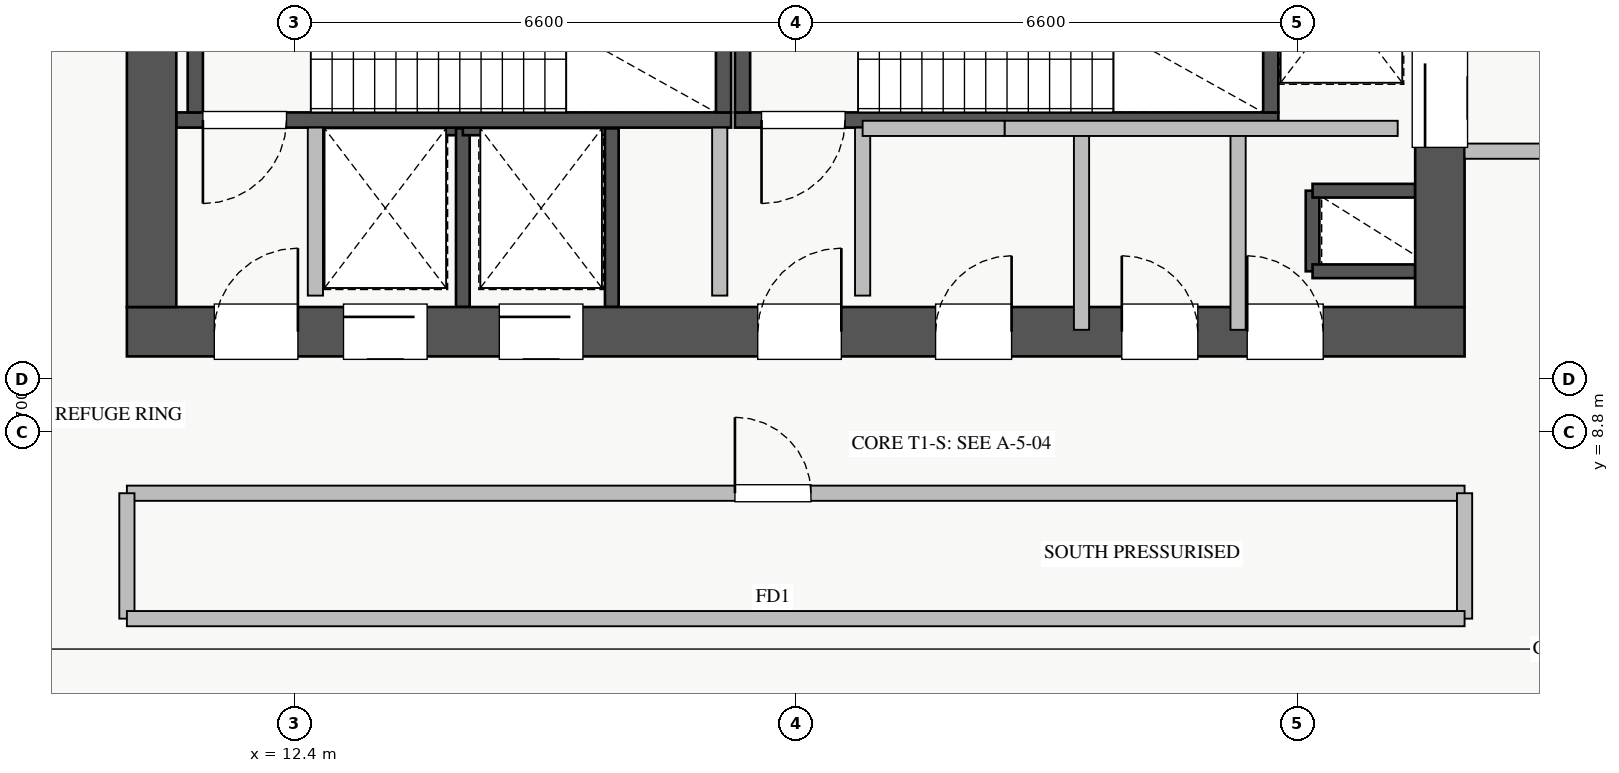
"""IFC4 building model, lengths in metres.
Left out: names, types, materials, properties, quantities, classifications, styles, units other than length and angle.
Written with IfcOpenShell. Run it as: python <this file> out.ifc"""

import sys

from ifc_helpers import new_model, si_unit, direction, frame, frame_2d, origin, place, context, subcontext, project, spatial, rectangle, extrude, source, transform, mapped, element, fill, save


model = new_model("IFC4")
c1 = context("Model", 3, precision=1e-05, world=origin(), true_north=direction((0.0, 1.0)))
c2 = subcontext(c1, "Body", "Model", "MODEL_VIEW")
j1 = project(units=[si_unit("LENGTHUNIT", "METRE"), si_unit("PLANEANGLEUNIT", "RADIAN")], contexts=[c1])
p1 = place(None, origin())
s1 = spatial("IfcSite", under=j1, at=p1, CompositionType="ELEMENT")
p2 = place(p1, origin())
s2 = spatial("IfcBuilding", under=s1, at=p2, CompositionType="ELEMENT")
p3 = place(p2, frame((0.0, 0.0, 139.25)))
s3 = spatial("IfcBuildingStorey", under=s2, at=p3, CompositionType="ELEMENT", Elevation=139.25)
p4 = place(p3, frame((12.68, 12.8, 0.0), z_axis=(0.0, 0.0, 1.0), x_axis=(1.0, 0.0, 0.0)))
e1 = element("IfcWall", 1, at=p4, inside=s3, PredefinedType="SHEAR", context=c2, shape_type="SweptSolid", body=[
    extrude(rectangle(XDim=1.94, YDim=0.18, at=frame_2d((0.97, 0.0))), origin(), (0.0, 0.0, 1.0), 4.32),
])
p5 = place(p3, frame((14.62, 10.45, 0.0), z_axis=(0.0, 0.0, 1.0), x_axis=(0.0, 1.0, 0.0)))
e2 = element("IfcWall", 2, at=p5, inside=s3, PredefinedType="SHEAR", context=c2, shape_type="SweptSolid", body=[
    extrude(rectangle(XDim=2.35, YDim=0.18, at=frame_2d((1.175, 0.0))), origin(), (0.0, 0.0, 1.0), 4.32),
])
p6 = place(p3, frame((25.8, 10.92, 0.0), z_axis=(0.0, 0.0, 1.0), x_axis=(0.0, 1.0, 0.0)))
e3 = element("IfcWall", 3, at=p6, inside=s3, PredefinedType="SHEAR", context=c2, shape_type="SweptSolid", body=[
    extrude(rectangle(XDim=1.06, YDim=0.18, at=frame_2d((0.53, 0.0))), origin(), (0.0, 0.0, 1.0), 4.32),
])
for number, where, z_axis, x_axis in (
    (4, (25.8, 11.98, 0.0), (0.0, 0.0, 1.0), (1.0, 0.0, 0.0)),
    (5, (25.8, 10.92, 0.0), (0.0, 0.0, 1.0), (1.0, 0.0, 0.0)),
):
    element("IfcWall", number, at=place(p3, frame(where, z_axis=z_axis, x_axis=x_axis)), inside=s3, PredefinedType="SHEAR", context=c2, shape_type="SweptSolid", body=[
        extrude(rectangle(XDim=1.35, YDim=0.18, at=frame_2d((0.675, 0.0))), origin(), (0.0, 0.0, 1.0), 4.32),
    ])
p7 = place(p3, frame((14.62, 12.8, 0.0), z_axis=(0.0, 0.0, 1.0), x_axis=(1.0, 0.0, 0.0)))
e6 = element("IfcWall", 6, at=p7, inside=s3, PredefinedType="SHEAR", context=c2, shape_type="SweptSolid", body=[
    extrude(rectangle(XDim=1.96, YDim=0.18, at=frame_2d((0.98, 0.0))), origin(), (0.0, 0.0, 1.0), 4.32),
])
p8 = place(p3, frame((16.58, 10.45, 0.0), z_axis=(0.0, 0.0, 1.0), x_axis=(0.0, 1.0, 0.0)))
e7 = element("IfcWall", 7, at=p8, inside=s3, PredefinedType="SHEAR", context=c2, shape_type="SweptSolid", body=[
    extrude(rectangle(XDim=2.35, YDim=0.18, at=frame_2d((1.175, 0.0))), origin(), (0.0, 0.0, 1.0), 4.32),
])
p9 = place(p3, frame((10.85, 12.91, 0.0), z_axis=(0.0, 0.0, 1.0), x_axis=(1.0, 0.0, 0.0)))
e8 = element("IfcWall", 8, at=p9, inside=s3, PredefinedType="SHEAR", context=c2, shape_type="SweptSolid", body=[
    extrude(rectangle(XDim=7.3, YDim=0.2, at=frame_2d((3.65, 0.0))), origin(), (0.0, 0.0, 1.0), 4.5),
])
p10 = place(p9, frame((0.35, 0.0, 0.0)))
e9 = element("IfcOpeningElement", 9, at=p10, cuts=e8, PredefinedType="OPENING", context=c2, shape_type="SweptSolid", body=[
    extrude(rectangle(XDim=1.1, YDim=2.05, at=frame_2d((0.55, 1.025))), frame((0.0, 0.11, 0.0), z_axis=(0.0, -1.0, 0.0), x_axis=(1.0, 0.0, 0.0)), (0.0, 0.0, 1.0), 0.22),
])
for number, where, z_axis, x_axis in (
    (10, (11.1, 13.01, 0.0), (0.0, 0.0, 1.0), (0.0, 1.0, 0.0)),
    (11, (18.05, 13.01, 0.0), (0.0, 0.0, 1.0), (0.0, 1.0, 0.0)),
):
    element("IfcWall", number, at=place(p3, frame(where, z_axis=z_axis, x_axis=x_axis)), inside=s3, PredefinedType="SHEAR", context=c2, shape_type="SweptSolid", body=[
        extrude(rectangle(XDim=2.94, YDim=0.2, at=frame_2d((1.47, 0.0))), origin(), (0.0, 0.0, 1.0), 4.5),
    ])
p11 = place(p3, frame((18.2, 12.91, 0.0), z_axis=(0.0, 0.0, 1.0), x_axis=(1.0, 0.0, 0.0)))
e12 = element("IfcWall", 12, at=p11, inside=s3, PredefinedType="SHEAR", context=c2, shape_type="SweptSolid", body=[
    extrude(rectangle(XDim=7.15, YDim=0.2, at=frame_2d((3.575, 0.0))), origin(), (0.0, 0.0, 1.0), 4.5),
])
p12 = place(p11, frame((0.35, 0.0, 0.0)))
e13 = element("IfcOpeningElement", 13, at=p12, cuts=e12, PredefinedType="OPENING", context=c2, shape_type="SweptSolid", body=[
    extrude(rectangle(XDim=1.1, YDim=2.05, at=frame_2d((0.55, 1.025))), frame((0.0, 0.11, 0.0), z_axis=(0.0, -1.0, 0.0), x_axis=(1.0, 0.0, 0.0)), (0.0, 0.0, 1.0), 0.22),
])
for number, where, z_axis, x_axis in (
    (14, (18.3, 13.01, 0.0), (0.0, 0.0, 1.0), (0.0, 1.0, 0.0)),
    (15, (25.25, 13.01, 0.0), (0.0, 0.0, 1.0), (0.0, 1.0, 0.0)),
):
    element("IfcWall", number, at=place(p3, frame(where, z_axis=z_axis, x_axis=x_axis)), inside=s3, PredefinedType="SHEAR", context=c2, shape_type="SweptSolid", body=[
        extrude(rectangle(XDim=2.94, YDim=0.2, at=frame_2d((1.47, 0.0))), origin(), (0.0, 0.0, 1.0), 4.5),
    ])
p13 = place(p3, frame((10.2, 10.125, 0.0), z_axis=(0.0, 0.0, 1.0), x_axis=(1.0, 0.0, 0.0)))
e16 = element("IfcWall", 16, at=p13, inside=s3, PredefinedType="SHEAR", context=c2, shape_type="SweptSolid", body=[
    extrude(rectangle(XDim=17.6, YDim=0.65, at=frame_2d((8.8, 0.0))), origin(), (0.0, 0.0, 1.0), 4.5),
])
p14 = place(p13, frame((1.15, 0.0, 0.0)))
e17 = element("IfcOpeningElement", 17, at=p14, cuts=e16, PredefinedType="OPENING", context=c2, shape_type="SweptSolid", body=[
    extrude(rectangle(XDim=1.1, YDim=2.05, at=frame_2d((0.55, 1.025))), frame((0.0, 0.335, 0.0), z_axis=(0.0, -1.0, 0.0), x_axis=(1.0, 0.0, 0.0)), (0.0, 0.0, 1.0), 0.67),
])
p15 = place(p13, frame((8.3, 0.0, 0.0)))
e18 = element("IfcOpeningElement", 18, at=p15, cuts=e16, PredefinedType="OPENING", context=c2, shape_type="SweptSolid", body=[
    extrude(rectangle(XDim=1.1, YDim=2.05, at=frame_2d((0.55, 1.025))), frame((0.0, 0.335, 0.0), z_axis=(0.0, -1.0, 0.0), x_axis=(1.0, 0.0, 0.0)), (0.0, 0.0, 1.0), 0.67),
])
p16 = place(p13, frame((4.9, 0.0, 0.0)))
e19 = element("IfcOpeningElement", 19, at=p16, cuts=e16, PredefinedType="OPENING", context=c2, shape_type="SweptSolid", body=[
    extrude(rectangle(XDim=1.1, YDim=2.05, at=frame_2d((0.55, 1.025))), frame((0.0, 0.335, 0.0), z_axis=(0.0, -1.0, 0.0), x_axis=(1.0, 0.0, 0.0)), (0.0, 0.0, 1.0), 0.67),
])
p17 = place(p13, frame((2.85, 0.0, 0.0)))
e20 = element("IfcOpeningElement", 20, at=p17, cuts=e16, PredefinedType="OPENING", context=c2, shape_type="SweptSolid", body=[
    extrude(rectangle(XDim=1.1, YDim=2.05, at=frame_2d((0.55, 1.025))), frame((0.0, 0.335, 0.0), z_axis=(0.0, -1.0, 0.0), x_axis=(1.0, 0.0, 0.0)), (0.0, 0.0, 1.0), 0.67),
])
p18 = place(p13, frame((14.74, 0.0, 0.0)))
e21 = element("IfcOpeningElement", 21, at=p18, cuts=e16, PredefinedType="OPENING", context=c2, shape_type="SweptSolid", body=[
    extrude(rectangle(XDim=1.0, YDim=2.05, at=frame_2d((0.5, 1.025))), frame((0.0, 0.335, 0.0), z_axis=(0.0, -1.0, 0.0), x_axis=(1.0, 0.0, 0.0)), (0.0, 0.0, 1.0), 0.67),
])
p19 = place(p13, frame((10.64, 0.0, 0.0)))
e22 = element("IfcOpeningElement", 22, at=p19, cuts=e16, PredefinedType="OPENING", context=c2, shape_type="SweptSolid", body=[
    extrude(rectangle(XDim=1.0, YDim=2.05, at=frame_2d((0.5, 1.025))), frame((0.0, 0.335, 0.0), z_axis=(0.0, -1.0, 0.0), x_axis=(1.0, 0.0, 0.0)), (0.0, 0.0, 1.0), 0.67),
])
p20 = place(p13, frame((13.09, 0.0, 0.0)))
e23 = element("IfcOpeningElement", 23, at=p20, cuts=e16, PredefinedType="OPENING", context=c2, shape_type="SweptSolid", body=[
    extrude(rectangle(XDim=1.0, YDim=2.05, at=frame_2d((0.5, 1.025))), frame((0.0, 0.335, 0.0), z_axis=(0.0, -1.0, 0.0), x_axis=(1.0, 0.0, 0.0)), (0.0, 0.0, 1.0), 0.67),
])
p21 = place(p3, frame((10.525, 10.45, 0.0), z_axis=(0.0, 0.0, 1.0), x_axis=(0.0, 1.0, 0.0)))
e24 = element("IfcWall", 24, at=p21, inside=s3, PredefinedType="SHEAR", context=c2, shape_type="SweptSolid", body=[
    extrude(rectangle(XDim=5.9, YDim=0.65, at=frame_2d((2.95, 0.0))), origin(), (0.0, 0.0, 1.0), 4.5),
])
p22 = place(p3, frame((27.475, 10.45, 0.0), z_axis=(0.0, 0.0, 1.0), x_axis=(0.0, 1.0, 0.0)))
e25 = element("IfcWall", 25, at=p22, inside=s3, PredefinedType="SHEAR", context=c2, shape_type="SweptSolid", body=[
    extrude(rectangle(XDim=5.9, YDim=0.65, at=frame_2d((2.95, 0.0))), origin(), (0.0, 0.0, 1.0), 4.5),
])
p23 = place(p22, frame((2.1, 0.0, 0.0)))
e26 = element("IfcOpeningElement", 26, at=p23, cuts=e25, PredefinedType="OPENING", context=c2, shape_type="SweptSolid", body=[
    extrude(rectangle(XDim=1.3, YDim=2.05, at=frame_2d((0.65, 1.025))), frame((0.0, 0.335, 0.0), z_axis=(0.0, -1.0, 0.0), x_axis=(1.0, 0.0, 0.0)), (0.0, 0.0, 1.0), 0.67),
])
p24 = place(p3, frame((27.8, 12.5, 0.0), z_axis=(0.0, 0.0, 1.0), x_axis=(1.0, 0.0, 0.0)))
e27 = element("IfcWall", 27, at=p24, inside=s3, PredefinedType="PARTITIONING", context=c2, shape_type="SweptSolid", body=[
    extrude(rectangle(XDim=3.1, YDim=0.2, at=frame_2d((1.55, 0.0))), origin(), (0.0, 0.0, 1.0), 4.32),
])
for number, where, z_axis, x_axis in (
    (28, (12.68, 10.6, 0.0), (0.0, 0.0, 1.0), (0.0, 1.0, 0.0)),
    (29, (18.0, 10.6, 0.0), (0.0, 0.0, 1.0), (0.0, 1.0, 0.0)),
    (30, (19.88, 10.6, 0.0), (0.0, 0.0, 1.0), (0.0, 1.0, 0.0)),
):
    element("IfcWall", number, at=place(p3, frame(where, z_axis=z_axis, x_axis=x_axis)), inside=s3, PredefinedType="PARTITIONING", context=c2, shape_type="SweptSolid", body=[
        extrude(rectangle(XDim=2.21, YDim=0.2, at=frame_2d((1.105, 0.0))), origin(), (0.0, 0.0, 1.0), 4.32),
    ])
p25 = place(p3, frame((24.82, 10.15, 0.0), z_axis=(0.0, 0.0, 1.0), x_axis=(0.0, 1.0, 0.0)))
e31 = element("IfcWall", 31, at=p25, inside=s3, PredefinedType="PARTITIONING", context=c2, shape_type="SweptSolid", body=[
    extrude(rectangle(XDim=2.65, YDim=0.2, at=frame_2d((1.325, 0.0))), origin(), (0.0, 0.0, 1.0), 4.32),
])
p26 = place(p3, frame((19.88, 12.8, 0.0), z_axis=(0.0, 0.0, 1.0), x_axis=(1.0, 0.0, 0.0)))
e32 = element("IfcWall", 32, at=p26, inside=s3, PredefinedType="PARTITIONING", context=c2, shape_type="SweptSolid", body=[
    extrude(rectangle(XDim=1.87, YDim=0.2, at=frame_2d((0.935, 0.0))), origin(), (0.0, 0.0, 1.0), 4.32),
])
p27 = place(p3, frame((22.76, 10.15, 0.0), z_axis=(0.0, 0.0, 1.0), x_axis=(0.0, 1.0, 0.0)))
e33 = element("IfcWall", 33, at=p27, inside=s3, PredefinedType="PARTITIONING", context=c2, shape_type="SweptSolid", body=[
    extrude(rectangle(XDim=2.65, YDim=0.2, at=frame_2d((1.325, 0.0))), origin(), (0.0, 0.0, 1.0), 4.32),
])
p28 = place(p3, frame((21.75, 12.8, 0.0), z_axis=(0.0, 0.0, 1.0), x_axis=(1.0, 0.0, 0.0)))
e34 = element("IfcWall", 34, at=p28, inside=s3, PredefinedType="PARTITIONING", context=c2, shape_type="SweptSolid", body=[
    extrude(rectangle(XDim=5.17, YDim=0.2, at=frame_2d((2.585, 0.0))), origin(), (0.0, 0.0, 1.0), 4.32),
])
p29 = place(p3, frame((10.2, 8.0, 0.0), z_axis=(0.0, 0.0, 1.0), x_axis=(1.0, 0.0, 0.0)))
e35 = element("IfcWall", 35, at=p29, inside=s3, PredefinedType="PARTITIONING", context=c2, shape_type="SweptSolid", body=[
    extrude(rectangle(XDim=17.6, YDim=0.2, at=frame_2d((8.8, 0.0))), origin(), (0.0, 0.0, 1.0), 4.32),
])
p30 = place(p29, frame((8.0, 0.0, 0.0)))
e36 = element("IfcOpeningElement", 36, at=p30, cuts=e35, PredefinedType="OPENING", context=c2, shape_type="SweptSolid", body=[
    extrude(rectangle(XDim=1.0, YDim=2.05, at=frame_2d((0.5, 1.025))), frame((0.0, 0.11, 0.0), z_axis=(0.0, -1.0, 0.0), x_axis=(1.0, 0.0, 0.0)), (0.0, 0.0, 1.0), 0.22),
])
for number, where, z_axis, x_axis in (
    (37, (10.2, 6.35, 0.0), (0.0, 0.0, 1.0), (0.0, 1.0, 0.0)),
    (38, (27.8, 6.35, 0.0), (0.0, 0.0, 1.0), (0.0, 1.0, 0.0)),
):
    element("IfcWall", number, at=place(p3, frame(where, z_axis=z_axis, x_axis=x_axis)), inside=s3, PredefinedType="PARTITIONING", context=c2, shape_type="SweptSolid", body=[
        extrude(rectangle(XDim=1.65, YDim=0.2, at=frame_2d((0.825, 0.0))), origin(), (0.0, 0.0, 1.0), 4.32),
    ])
p31 = place(p3, frame((10.2, 6.35, 0.0), z_axis=(0.0, 0.0, 1.0), x_axis=(1.0, 0.0, 0.0)))
e39 = element("IfcWall", 39, at=p31, inside=s3, PredefinedType="PARTITIONING", context=c2, shape_type="SweptSolid", body=[
    extrude(rectangle(XDim=17.6, YDim=0.2, at=frame_2d((8.8, 0.0))), origin(), (0.0, 0.0, 1.0), 4.32),
])
m1 = source(origin(), c2, "Body", "SweptSolid", [
    extrude(rectangle(XDim=1.3, YDim=2.05, at=frame_2d((0.65, 1.025))), frame((0.0, 0.025, 0.0), z_axis=(0.0, -1.0, 0.0), x_axis=(1.0, 0.0, 0.0)), (0.0, 0.0, 1.0), 0.05),
])
p32 = place(p23, origin())
e40 = element("IfcDoor", 40, at=p32, inside=s3, OperationType="SLIDING_TO_RIGHT", PredefinedType="DOOR", context=c2, shape_type="MappedRepresentation", body=[
    mapped(m1, transform((0.0, 0.0, 0.0), x_axis=(1.0, 0.0, 0.0), y_axis=(0.0, 1.0, 0.0), z_axis=(0.0, 0.0, 1.0), scale=1.0)),
])
fill(e26, e40)
m2 = source(origin(), c2, "Body", "SweptSolid", [
    extrude(rectangle(XDim=1.1, YDim=2.05, at=frame_2d((0.55, 1.025))), frame((0.0, 0.025, 0.0), z_axis=(0.0, -1.0, 0.0), x_axis=(1.0, 0.0, 0.0)), (0.0, 0.0, 1.0), 0.05),
])
p33 = place(p14, origin())
e41 = element("IfcDoor", 41, at=p33, inside=s3, OperationType="SINGLE_SWING_RIGHT", PredefinedType="DOOR", context=c2, shape_type="MappedRepresentation", body=[
    mapped(m2, transform((0.0, 0.0, 0.0), x_axis=(1.0, 0.0, 0.0), y_axis=(0.0, 1.0, 0.0), z_axis=(0.0, 0.0, 1.0), scale=1.0)),
])
fill(e17, e41)
p34 = place(p10, frame((1.1, 0.0, 0.0), z_axis=(0.0, 0.0, 1.0), x_axis=(-1.0, 0.0, 0.0)))
e42 = element("IfcDoor", 42, at=p34, inside=s3, OperationType="SINGLE_SWING_LEFT", PredefinedType="DOOR", context=c2, shape_type="MappedRepresentation", body=[
    mapped(m2, transform((0.0, 0.0, 0.0), x_axis=(1.0, 0.0, 0.0), y_axis=(0.0, 1.0, 0.0), z_axis=(0.0, 0.0, 1.0), scale=1.0)),
])
fill(e9, e42)
p35 = place(p15, origin())
e43 = element("IfcDoor", 43, at=p35, inside=s3, OperationType="SINGLE_SWING_RIGHT", PredefinedType="DOOR", context=c2, shape_type="MappedRepresentation", body=[
    mapped(m2, transform((0.0, 0.0, 0.0), x_axis=(1.0, 0.0, 0.0), y_axis=(0.0, 1.0, 0.0), z_axis=(0.0, 0.0, 1.0), scale=1.0)),
])
fill(e18, e43)
p36 = place(p12, frame((1.1, 0.0, 0.0), z_axis=(0.0, 0.0, 1.0), x_axis=(-1.0, 0.0, 0.0)))
e44 = element("IfcDoor", 44, at=p36, inside=s3, OperationType="SINGLE_SWING_LEFT", PredefinedType="DOOR", context=c2, shape_type="MappedRepresentation", body=[
    mapped(m2, transform((0.0, 0.0, 0.0), x_axis=(1.0, 0.0, 0.0), y_axis=(0.0, 1.0, 0.0), z_axis=(0.0, 0.0, 1.0), scale=1.0)),
])
fill(e13, e44)
p37 = place(p16, origin())
e45 = element("IfcDoor", 45, at=p37, inside=s3, OperationType="SLIDING_TO_RIGHT", PredefinedType="DOOR", context=c2, shape_type="MappedRepresentation", body=[
    mapped(m2, transform((0.0, 0.0, 0.0), x_axis=(1.0, 0.0, 0.0), y_axis=(0.0, 1.0, 0.0), z_axis=(0.0, 0.0, 1.0), scale=1.0)),
])
fill(e19, e45)
p38 = place(p17, origin())
e46 = element("IfcDoor", 46, at=p38, inside=s3, OperationType="SLIDING_TO_RIGHT", PredefinedType="DOOR", context=c2, shape_type="MappedRepresentation", body=[
    mapped(m2, transform((0.0, 0.0, 0.0), x_axis=(1.0, 0.0, 0.0), y_axis=(0.0, 1.0, 0.0), z_axis=(0.0, 0.0, 1.0), scale=1.0)),
])
fill(e20, e46)
m3 = source(origin(), c2, "Body", "SweptSolid", [
    extrude(rectangle(XDim=1.0, YDim=2.05, at=frame_2d((0.5, 1.025))), frame((0.0, 0.025, 0.0), z_axis=(0.0, -1.0, 0.0), x_axis=(1.0, 0.0, 0.0)), (0.0, 0.0, 1.0), 0.05),
])
p39 = place(p18, origin())
e47 = element("IfcDoor", 47, at=p39, inside=s3, OperationType="SINGLE_SWING_LEFT", PredefinedType="DOOR", context=c2, shape_type="MappedRepresentation", body=[
    mapped(m3, transform((0.0, 0.0, 0.0), x_axis=(1.0, 0.0, 0.0), y_axis=(0.0, 1.0, 0.0), z_axis=(0.0, 0.0, 1.0), scale=1.0)),
])
fill(e21, e47)
p40 = place(p19, origin())
e48 = element("IfcDoor", 48, at=p40, inside=s3, OperationType="SINGLE_SWING_RIGHT", PredefinedType="DOOR", context=c2, shape_type="MappedRepresentation", body=[
    mapped(m3, transform((0.0, 0.0, 0.0), x_axis=(1.0, 0.0, 0.0), y_axis=(0.0, 1.0, 0.0), z_axis=(0.0, 0.0, 1.0), scale=1.0)),
])
fill(e22, e48)
p41 = place(p20, origin())
e49 = element("IfcDoor", 49, at=p41, inside=s3, OperationType="SINGLE_SWING_LEFT", PredefinedType="DOOR", context=c2, shape_type="MappedRepresentation", body=[
    mapped(m3, transform((0.0, 0.0, 0.0), x_axis=(1.0, 0.0, 0.0), y_axis=(0.0, 1.0, 0.0), z_axis=(0.0, 0.0, 1.0), scale=1.0)),
])
fill(e23, e49)
p42 = place(p30, origin())
e50 = element("IfcDoor", 50, at=p42, inside=s3, OperationType="SINGLE_SWING_LEFT", PredefinedType="DOOR", context=c2, shape_type="MappedRepresentation", body=[
    mapped(m3, transform((0.0, 0.0, 0.0), x_axis=(1.0, 0.0, 0.0), y_axis=(0.0, 1.0, 0.0), z_axis=(0.0, 0.0, 1.0), scale=1.0)),
])
fill(e36, e50)
save(model, sys.argv[1])
